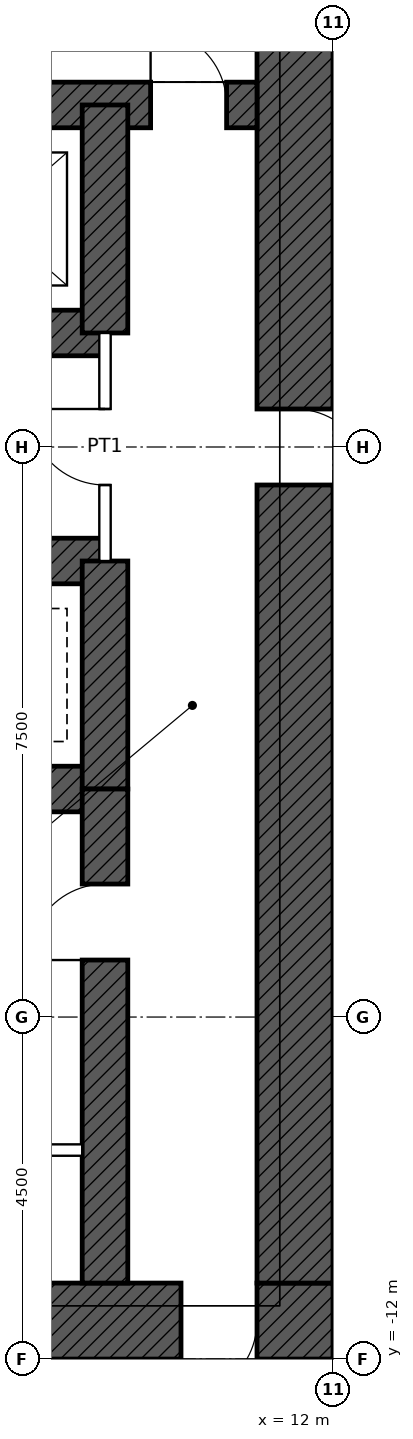
"""IFC4 building model, lengths in metres.
Left out: names, types, materials, properties, quantities, classifications, styles, units other than length and angle.
Written with IfcOpenShell. Run it as: python <this file> out.ifc"""

import sys

from ifc_helpers import new_model, si_unit, direction, frame, frame_2d, origin, place, context, subcontext, project, spatial, rectangle, extrude, element, fill, save


model = new_model("IFC4")
c1 = context("Model", 3, precision=1e-05, world=origin(), true_north=direction((0.0, 1.0)))
c2 = subcontext(c1, "Body", "Model", "MODEL_VIEW")
j1 = project(units=[si_unit("LENGTHUNIT", "METRE"), si_unit("PLANEANGLEUNIT", "RADIAN")], contexts=[c1])
p1 = place(None, origin())
s1 = spatial("IfcSite", under=j1, at=p1, CompositionType="ELEMENT")
p2 = place(p1, origin())
s2 = spatial("IfcBuilding", under=s1, at=p2, CompositionType="ELEMENT")
p3 = place(p2, frame((0.0, 0.0, 38.4)))
s3 = spatial("IfcBuildingStorey", under=s2, at=p3, CompositionType="ELEMENT", Elevation=38.4)
p4 = place(p3, frame((12.0, -11.5, 0.0), z_axis=(0.0, 0.0, 1.0), x_axis=(-1.0, 0.0, 0.0)))
e1 = element("IfcWall", 1, at=p4, inside=s3, PredefinedType="SHEAR", context=c2, shape_type="SweptSolid", body=[
    extrude(rectangle(XDim=24.0, YDim=1.0, at=frame_2d((12.0, 0.0))), origin(), (0.0, 0.0, 1.0), 5.0),
])
p5 = place(p4, frame((11.5, 0.0, 0.0)))
e2 = element("IfcOpeningElement", 2, at=p5, cuts=e1, PredefinedType="OPENING", context=c2, shape_type="SweptSolid", body=[
    extrude(rectangle(XDim=1.0, YDim=2.1, at=frame_2d((0.5, 1.05))), frame((0.0, 0.51, 0.0), z_axis=(0.0, -1.0, 0.0), x_axis=(1.0, 0.0, 0.0)), (0.0, 0.0, 1.0), 1.02),
])
p6 = place(p4, frame((1.0, 0.0, 0.0)))
e3 = element("IfcOpeningElement", 3, at=p6, cuts=e1, PredefinedType="OPENING", context=c2, shape_type="SweptSolid", body=[
    extrude(rectangle(XDim=1.0, YDim=2.4, at=frame_2d((0.5, 1.2))), frame((0.0, 0.51, 0.0), z_axis=(0.0, -1.0, 0.0), x_axis=(1.0, 0.0, 0.0)), (0.0, 0.0, 1.0), 1.02),
])
p7 = place(p3, frame((11.5, 11.0, 0.0), z_axis=(0.0, 0.0, 1.0), x_axis=(0.0, -1.0, 0.0)))
e4 = element("IfcWall", 4, at=p7, inside=s3, PredefinedType="SHEAR", context=c2, shape_type="SweptSolid", body=[
    extrude(rectangle(XDim=22.0, YDim=1.0, at=frame_2d((11.0, 0.0))), origin(), (0.0, 0.0, 1.0), 5.0),
])
p8 = place(p7, frame((10.5, 0.0, 0.0)))
e5 = element("IfcOpeningElement", 5, at=p8, cuts=e4, PredefinedType="OPENING", context=c2, shape_type="SweptSolid", body=[
    extrude(rectangle(XDim=1.0, YDim=2.4, at=frame_2d((0.5, 1.2))), frame((0.0, 0.51, 0.0), z_axis=(0.0, -1.0, 0.0), x_axis=(1.0, 0.0, 0.0)), (0.0, 0.0, 1.0), 1.02),
])
p9 = place(p3, frame((-11.0, 4.5, 0.0), z_axis=(0.0, 0.0, 1.0), x_axis=(1.0, 0.0, 0.0)))
e6 = element("IfcWall", 6, at=p9, inside=s3, PredefinedType="SHEAR", context=c2, shape_type="SweptSolid", body=[
    extrude(rectangle(XDim=22.0, YDim=0.6, at=frame_2d((11.0, 0.0))), origin(), (0.0, 0.0, 1.0), 5.0),
])
p10 = place(p9, frame((0.4, 0.0, 0.0)))
e7 = element("IfcOpeningElement", 7, at=p10, cuts=e6, PredefinedType="OPENING", context=c2, shape_type="SweptSolid", body=[
    extrude(rectangle(XDim=1.0, YDim=2.1, at=frame_2d((0.5, 1.05))), frame((0.0, 0.31, 0.0), z_axis=(0.0, -1.0, 0.0), x_axis=(1.0, 0.0, 0.0)), (0.0, 0.0, 1.0), 0.62),
])
p11 = place(p9, frame((20.6, 0.0, 0.0)))
e8 = element("IfcOpeningElement", 8, at=p11, cuts=e6, PredefinedType="OPENING", context=c2, shape_type="SweptSolid", body=[
    extrude(rectangle(XDim=1.0, YDim=2.1, at=frame_2d((0.5, 1.05))), frame((0.0, 0.31, 0.0), z_axis=(0.0, -1.0, 0.0), x_axis=(1.0, 0.0, 0.0)), (0.0, 0.0, 1.0), 0.62),
])
p12 = place(p3, frame((-9.0, 1.5, 0.0), z_axis=(0.0, 0.0, 1.0), x_axis=(1.0, 0.0, 0.0)))
e9 = element("IfcWall", 9, at=p12, inside=s3, PredefinedType="SHEAR", context=c2, shape_type="SweptSolid", body=[
    extrude(rectangle(XDim=18.0, YDim=0.6, at=frame_2d((9.0, 0.0))), origin(), (0.0, 0.0, 1.0), 5.0),
])
p13 = place(p12, frame((9.95, 0.0, 0.0)))
e10 = element("IfcOpeningElement", 10, at=p13, cuts=e9, PredefinedType="OPENING", context=c2, shape_type="SweptSolid", body=[
    extrude(rectangle(XDim=1.1, YDim=2.1, at=frame_2d((0.55, 1.05))), frame((0.0, 0.31, 0.0), z_axis=(0.0, -1.0, 0.0), x_axis=(1.0, 0.0, 0.0)), (0.0, 0.0, 1.0), 0.62),
])
p14 = place(p12, frame((12.95, 0.0, 0.0)))
e11 = element("IfcOpeningElement", 11, at=p14, cuts=e9, PredefinedType="OPENING", context=c2, shape_type="SweptSolid", body=[
    extrude(rectangle(XDim=1.1, YDim=2.1, at=frame_2d((0.55, 1.05))), frame((0.0, 0.31, 0.0), z_axis=(0.0, -1.0, 0.0), x_axis=(1.0, 0.0, 0.0)), (0.0, 0.0, 1.0), 0.62),
])
p15 = place(p12, frame((15.95, 0.0, 0.0)))
e12 = element("IfcOpeningElement", 12, at=p15, cuts=e9, PredefinedType="OPENING", context=c2, shape_type="SweptSolid", body=[
    extrude(rectangle(XDim=1.1, YDim=2.1, at=frame_2d((0.55, 1.05))), frame((0.0, 0.31, 0.0), z_axis=(0.0, -1.0, 0.0), x_axis=(1.0, 0.0, 0.0)), (0.0, 0.0, 1.0), 0.62),
])
p16 = place(p12, frame((0.95, 0.0, 0.0)))
e13 = element("IfcOpeningElement", 13, at=p16, cuts=e9, PredefinedType="OPENING", context=c2, shape_type="SweptSolid", body=[
    extrude(rectangle(XDim=1.1, YDim=2.1, at=frame_2d((0.55, 1.05))), frame((0.0, 0.31, 0.0), z_axis=(0.0, -1.0, 0.0), x_axis=(1.0, 0.0, 0.0)), (0.0, 0.0, 1.0), 0.62),
])
p17 = place(p12, frame((3.95, 0.0, 0.0)))
e14 = element("IfcOpeningElement", 14, at=p17, cuts=e9, PredefinedType="OPENING", context=c2, shape_type="SweptSolid", body=[
    extrude(rectangle(XDim=1.1, YDim=2.1, at=frame_2d((0.55, 1.05))), frame((0.0, 0.31, 0.0), z_axis=(0.0, -1.0, 0.0), x_axis=(1.0, 0.0, 0.0)), (0.0, 0.0, 1.0), 0.62),
])
p18 = place(p12, frame((6.95, 0.0, 0.0)))
e15 = element("IfcOpeningElement", 15, at=p18, cuts=e9, PredefinedType="OPENING", context=c2, shape_type="SweptSolid", body=[
    extrude(rectangle(XDim=1.1, YDim=2.1, at=frame_2d((0.55, 1.05))), frame((0.0, 0.31, 0.0), z_axis=(0.0, -1.0, 0.0), x_axis=(1.0, 0.0, 0.0)), (0.0, 0.0, 1.0), 0.62),
])
for number, where, z_axis, x_axis in (
    (16, (-9.0, -1.5, 0.0), (0.0, 0.0, 1.0), (1.0, 0.0, 0.0)),
    (17, (-9.0, -4.5, 0.0), (0.0, 0.0, 1.0), (1.0, 0.0, 0.0)),
):
    element("IfcWall", number, at=place(p3, frame(where, z_axis=z_axis, x_axis=x_axis)), inside=s3, PredefinedType="SHEAR", context=c2, shape_type="SweptSolid", body=[
        extrude(rectangle(XDim=18.0, YDim=0.6, at=frame_2d((9.0, 0.0))), origin(), (0.0, 0.0, 1.0), 5.0),
    ])
for number, where, z_axis, x_axis in (
    (18, (9.0, 1.5, 0.0), (0.0, 0.0, 1.0), (0.0, 1.0, 0.0)),
    (19, (9.0, -4.5, 0.0), (0.0, 0.0, 1.0), (0.0, 1.0, 0.0)),
):
    element("IfcWall", number, at=place(p3, frame(where, z_axis=z_axis, x_axis=x_axis)), inside=s3, PredefinedType="SHEAR", context=c2, shape_type="SweptSolid", body=[
        extrude(rectangle(XDim=3.0, YDim=0.6, at=frame_2d((1.5, 0.0))), origin(), (0.0, 0.0, 1.0), 5.0),
    ])
p19 = place(p3, frame((9.0, -11.0, 0.0), z_axis=(0.0, 0.0, 1.0), x_axis=(0.0, 1.0, 0.0)))
e20 = element("IfcWall", 20, at=p19, inside=s3, PredefinedType="SHEAR", context=c2, shape_type="SweptSolid", body=[
    extrude(rectangle(XDim=6.5, YDim=0.6, at=frame_2d((3.25, 0.0))), origin(), (0.0, 0.0, 1.0), 5.0),
])
p20 = place(p19, frame((4.25, 0.0, 0.0)))
e21 = element("IfcOpeningElement", 21, at=p20, cuts=e20, PredefinedType="OPENING", context=c2, shape_type="SweptSolid", body=[
    extrude(rectangle(XDim=1.0, YDim=2.1, at=frame_2d((0.5, 1.05))), frame((0.0, 0.31, 0.0), z_axis=(0.0, -1.0, 0.0), x_axis=(1.0, 0.0, 0.0)), (0.0, 0.0, 1.0), 0.62),
])
p21 = place(p3, frame((3.3, -9.25, 0.0), z_axis=(0.0, 0.0, 1.0), x_axis=(1.0, 0.0, 0.0)))
e22 = element("IfcWall", 22, at=p21, inside=s3, PredefinedType="PARTITIONING", context=c2, shape_type="SweptSolid", body=[
    extrude(rectangle(XDim=5.4, YDim=0.15, at=frame_2d((2.7, 0.0))), origin(), (0.0, 0.0, 1.0), 4.75),
])
p22 = place(p21, frame((2.2, 0.0, 0.0)))
e23 = element("IfcOpeningElement", 23, at=p22, cuts=e22, PredefinedType="OPENING", context=c2, shape_type="SweptSolid", body=[
    extrude(rectangle(XDim=1.0, YDim=2.1, at=frame_2d((0.5, 1.05))), frame((0.0, 0.085, 0.0), z_axis=(0.0, -1.0, 0.0), x_axis=(1.0, 0.0, 0.0)), (0.0, 0.0, 1.0), 0.17),
])
p23 = place(p3, frame((9.0, -1.5, 0.0), z_axis=(0.0, 0.0, 1.0), x_axis=(0.0, 1.0, 0.0)))
e24 = element("IfcWall", 24, at=p23, inside=s3, PredefinedType="PARTITIONING", context=c2, shape_type="SweptSolid", body=[
    extrude(rectangle(XDim=3.0, YDim=0.15, at=frame_2d((1.5, 0.0))), origin(), (0.0, 0.0, 1.0), 4.75),
])
p24 = place(p23, frame((1.0, 0.0, 0.0)))
e25 = element("IfcOpeningElement", 25, at=p24, cuts=e24, PredefinedType="OPENING", context=c2, shape_type="SweptSolid", body=[
    extrude(rectangle(XDim=1.0, YDim=2.4, at=frame_2d((0.5, 1.2))), frame((0.0, 0.085, 0.0), z_axis=(0.0, -1.0, 0.0), x_axis=(1.0, 0.0, 0.0)), (0.0, 0.0, 1.0), 0.17),
])
p25 = place(p11, origin())
e26 = element("IfcDoor", 26, at=p25, inside=s3, OperationType="SINGLE_SWING_LEFT", PredefinedType="DOOR", context=c2, shape_type="SweptSolid", body=[
    extrude(rectangle(XDim=1.0, YDim=2.1, at=frame_2d((0.5, 1.05))), frame((0.0, 0.025, 0.0), z_axis=(0.0, -1.0, 0.0), x_axis=(1.0, 0.0, 0.0)), (0.0, 0.0, 1.0), 0.05),
])
fill(e8, e26)
p26 = place(p8, origin())
e27 = element("IfcDoor", 27, at=p26, inside=s3, OperationType="SINGLE_SWING_RIGHT", PredefinedType="DOOR", context=c2, shape_type="SweptSolid", body=[
    extrude(rectangle(XDim=1.0, YDim=2.4, at=frame_2d((0.5, 1.2))), frame((0.0, 0.485, 0.0), z_axis=(0.0, -1.0, 0.0), x_axis=(1.0, 0.0, 0.0)), (0.0, 0.0, 1.0), 0.05),
])
fill(e5, e27)
p27 = place(p6, origin())
e28 = element("IfcDoor", 28, at=p27, inside=s3, OperationType="SINGLE_SWING_RIGHT", PredefinedType="DOOR", context=c2, shape_type="SweptSolid", body=[
    extrude(rectangle(XDim=1.0, YDim=2.4, at=frame_2d((0.5, 1.2))), frame((0.0, 0.485, 0.0), z_axis=(0.0, -1.0, 0.0), x_axis=(1.0, 0.0, 0.0)), (0.0, 0.0, 1.0), 0.05),
])
fill(e3, e28)
p28 = place(p20, origin())
e29 = element("IfcDoor", 29, at=p28, inside=s3, OperationType="SINGLE_SWING_LEFT", PredefinedType="DOOR", context=c2, shape_type="SweptSolid", body=[
    extrude(rectangle(XDim=1.0, YDim=2.1, at=frame_2d((0.5, 1.05))), frame((0.0, 0.025, 0.0), z_axis=(0.0, -1.0, 0.0), x_axis=(1.0, 0.0, 0.0)), (0.0, 0.0, 1.0), 0.05),
])
fill(e21, e29)
p29 = place(p24, origin())
e30 = element("IfcDoor", 30, at=p29, inside=s3, OperationType="SINGLE_SWING_RIGHT", PredefinedType="DOOR", context=c2, shape_type="SweptSolid", body=[
    extrude(rectangle(XDim=1.0, YDim=2.4, at=frame_2d((0.5, 1.2))), frame((0.0, 0.025, 0.0), z_axis=(0.0, -1.0, 0.0), x_axis=(1.0, 0.0, 0.0)), (0.0, 0.0, 1.0), 0.05),
])
fill(e25, e30)
save(model, sys.argv[1])
